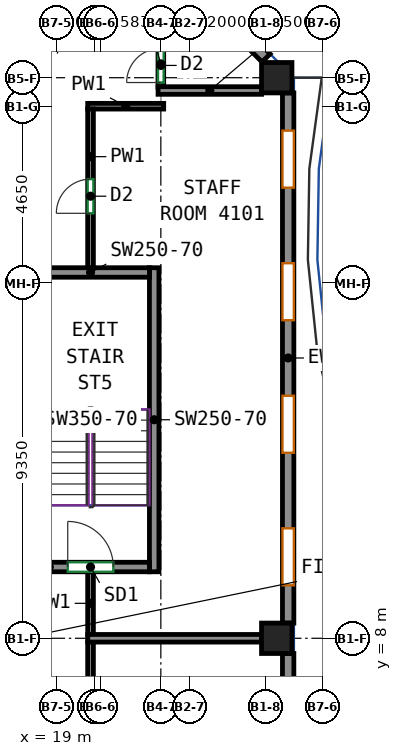
"""IFC4 building model, lengths in metres.
Left out: names, types, materials, properties, quantities, classifications, styles, units other than length and angle.
Written with IfcOpenShell. Run it as: python <this file> out.ifc"""

import sys

from ifc_helpers import new_model, si_unit, direction, frame, frame_2d, origin, origin_2d, place, context, subcontext, project, spatial, rectangle, extrude, source, transform, mapped, element, fill, save


model = new_model("IFC4")
c1 = context("Model", 3, precision=1e-05, world=origin(), true_north=direction((0.0, 1.0)))
c2 = subcontext(c1, "Body", "Model", "MODEL_VIEW")
j1 = project(units=[si_unit("LENGTHUNIT", "METRE"), si_unit("PLANEANGLEUNIT", "RADIAN")], contexts=[c1])
p1 = place(None, origin())
s1 = spatial("IfcSite", under=j1, at=p1, CompositionType="ELEMENT")
p2 = place(p1, origin())
s2 = spatial("IfcBuilding", under=s1, at=p2, CompositionType="ELEMENT")
p3 = place(p2, frame((0.0, 0.0, 175.3)))
s3 = spatial("IfcBuildingStorey", under=s2, at=p3, CompositionType="ELEMENT", Elevation=175.3)
m1 = source(origin(), c2, "Body", "SweptSolid", [
    extrude(rectangle(XDim=0.8, YDim=0.8, at=origin_2d()), origin(), (0.0, 0.0, 1.0), 3.12),
])
for number, where, z_axis, x_axis in (
    (1, (24.8, 8.0, 0.0), (0.0, 0.0, 1.0), (1.0, 0.0, 0.0)),
    (2, (24.8, 22.75, 0.0), (0.0, 0.0, 1.0), (1.0, 0.0, 0.0)),
):
    element("IfcColumn", number, at=place(p3, frame(where, z_axis=z_axis, x_axis=x_axis)), inside=s3, PredefinedType="COLUMN", context=c2, shape_type="MappedRepresentation", body=[
        mapped(m1, transform((0.0, 0.0, 0.0))),
    ])
m2 = source(origin(), c2, "Body", "SweptSolid", [
    extrude(rectangle(XDim=8.0, YDim=0.25, at=frame_2d((4.0, 0.0))), origin(), (0.0, 0.0, 1.0), 3.12),
])
p4 = place(p3, frame((21.575, 9.75, 0.0), z_axis=(0.0, 0.0, 1.0), x_axis=(0.0, 1.0, 0.0)))
e3 = element("IfcWall", 3, at=p4, inside=s3, PredefinedType="SHEAR", context=c2, shape_type="MappedRepresentation", body=[
    mapped(m2, transform((0.0, 0.0, 0.0))),
])
m3 = source(origin(), c2, "Body", "SweptSolid", [
    extrude(rectangle(XDim=3.1, YDim=0.25, at=frame_2d((1.55, 0.0))), origin(), (0.0, 0.0, 1.0), 3.12),
])
p5 = place(p3, frame((18.35, 9.875, 0.0), z_axis=(0.0, 0.0, 1.0), x_axis=(1.0, 0.0, 0.0)))
e4 = element("IfcWall", 4, at=p5, inside=s3, PredefinedType="SHEAR", context=c2, shape_type="MappedRepresentation", body=[
    mapped(m3, transform((0.0, 0.0, 0.0))),
])
p6 = place(p5, frame((0.95, 0.0, 0.0)))
e5 = element("IfcOpeningElement", 5, at=p6, cuts=e4, PredefinedType="OPENING", context=c2, shape_type="SweptSolid", body=[
    extrude(rectangle(XDim=1.2, YDim=2.1, at=frame_2d((0.6, 1.05))), frame((0.0, 0.135, 0.0), z_axis=(0.0, -1.0, 0.0), x_axis=(1.0, 0.0, 0.0)), (0.0, 0.0, 1.0), 0.27),
])
p7 = place(p3, frame((18.35, 17.625, 0.0), z_axis=(0.0, 0.0, 1.0), x_axis=(1.0, 0.0, 0.0)))
e6 = element("IfcWall", 6, at=p7, inside=s3, PredefinedType="SHEAR", context=c2, shape_type="MappedRepresentation", body=[
    mapped(m3, transform((0.0, 0.0, 0.0))),
])
m4 = source(origin(), c2, "Body", "SweptSolid", [
    extrude(rectangle(XDim=7.763, YDim=0.3, at=frame_2d((3.881, 0.0))), origin(), (0.0, 0.0, 1.0), 3.12),
])
p8 = place(p3, frame((25.1, -0.163, 0.0), z_axis=(0.0, 0.0, 1.0), x_axis=(0.0, 1.0, 0.0)))
e7 = element("IfcWall", 7, at=p8, inside=s3, PredefinedType="SOLIDWALL", context=c2, shape_type="MappedRepresentation", body=[
    mapped(m4, transform((0.0, 0.0, 0.0))),
])
p9 = place(p8, frame((1.75, 0.0, 0.85)))
e8 = element("IfcOpeningElement", 8, at=p9, cuts=e7, PredefinedType="OPENING", context=c2, shape_type="SweptSolid", body=[
    extrude(rectangle(XDim=1.5, YDim=1.95, at=frame_2d((0.75, 0.975))), frame((0.0, 0.16, 0.0), z_axis=(0.0, -1.0, 0.0), x_axis=(1.0, 0.0, 0.0)), (0.0, 0.0, 1.0), 0.32),
])
p10 = place(p8, frame((0.45, 0.0, 0.0)))
e9 = element("IfcOpeningElement", 9, at=p10, cuts=e7, PredefinedType="OPENING", context=c2, shape_type="SweptSolid", body=[
    extrude(rectangle(XDim=1.0, YDim=2.1, at=frame_2d((0.5, 1.05))), frame((0.0, 0.16, 0.0), z_axis=(0.0, -1.0, 0.0), x_axis=(1.0, 0.0, 0.0)), (0.0, 0.0, 1.0), 0.32),
])
p11 = place(p8, frame((5.631, 0.0, 0.85)))
e10 = element("IfcOpeningElement", 10, at=p11, cuts=e7, PredefinedType="OPENING", context=c2, shape_type="SweptSolid", body=[
    extrude(rectangle(XDim=1.5, YDim=1.95, at=frame_2d((0.75, 0.975))), frame((0.0, 0.16, 0.0), z_axis=(0.0, -1.0, 0.0), x_axis=(1.0, 0.0, 0.0)), (0.0, 0.0, 1.0), 0.32),
])
p12 = place(p8, frame((4.331, 0.0, 0.0)))
e11 = element("IfcOpeningElement", 11, at=p12, cuts=e7, PredefinedType="OPENING", context=c2, shape_type="SweptSolid", body=[
    extrude(rectangle(XDim=1.0, YDim=2.1, at=frame_2d((0.5, 1.05))), frame((0.0, 0.16, 0.0), z_axis=(0.0, -1.0, 0.0), x_axis=(1.0, 0.0, 0.0)), (0.0, 0.0, 1.0), 0.32),
])
m5 = source(origin(), c2, "Body", "SweptSolid", [
    extrude(rectangle(XDim=13.95, YDim=0.3, at=frame_2d((6.975, 0.0))), origin(), (0.0, 0.0, 1.0), 3.12),
])
p13 = place(p3, frame((25.1, 8.4, 0.0), z_axis=(0.0, 0.0, 1.0), x_axis=(0.0, 1.0, 0.0)))
e12 = element("IfcWall", 12, at=p13, inside=s3, PredefinedType="SOLIDWALL", context=c2, shape_type="MappedRepresentation", body=[
    mapped(m5, transform((0.0, 0.0, 0.0))),
])
p14 = place(p13, frame((0.994, 0.0, 0.85)))
e13 = element("IfcOpeningElement", 13, at=p14, cuts=e12, PredefinedType="OPENING", context=c2, shape_type="SweptSolid", body=[
    extrude(rectangle(XDim=1.5, YDim=1.95, at=frame_2d((0.75, 0.975))), frame((0.0, 0.16, 0.0), z_axis=(0.0, -1.0, 0.0), x_axis=(1.0, 0.0, 0.0)), (0.0, 0.0, 1.0), 0.32),
])
p15 = place(p13, frame((4.481, 0.0, 0.85)))
e14 = element("IfcOpeningElement", 14, at=p15, cuts=e12, PredefinedType="OPENING", context=c2, shape_type="SweptSolid", body=[
    extrude(rectangle(XDim=1.5, YDim=1.95, at=frame_2d((0.75, 0.975))), frame((0.0, 0.16, 0.0), z_axis=(0.0, -1.0, 0.0), x_axis=(1.0, 0.0, 0.0)), (0.0, 0.0, 1.0), 0.32),
])
p16 = place(p13, frame((7.969, 0.0, 0.85)))
e15 = element("IfcOpeningElement", 15, at=p16, cuts=e12, PredefinedType="OPENING", context=c2, shape_type="SweptSolid", body=[
    extrude(rectangle(XDim=1.5, YDim=1.95, at=frame_2d((0.75, 0.975))), frame((0.0, 0.16, 0.0), z_axis=(0.0, -1.0, 0.0), x_axis=(1.0, 0.0, 0.0)), (0.0, 0.0, 1.0), 0.32),
])
p17 = place(p13, frame((11.456, 0.0, 0.85)))
e16 = element("IfcOpeningElement", 16, at=p17, cuts=e12, PredefinedType="OPENING", context=c2, shape_type="SweptSolid", body=[
    extrude(rectangle(XDim=1.5, YDim=1.95, at=frame_2d((0.75, 0.975))), frame((0.0, 0.16, 0.0), z_axis=(0.0, -1.0, 0.0), x_axis=(1.0, 0.0, 0.0)), (0.0, 0.0, 1.0), 0.32),
])
m6 = source(origin(), c2, "Body", "SweptSolid", [
    extrude(rectangle(XDim=3.5, YDim=0.3, at=frame_2d((1.75, 0.0))), origin(), (0.0, 0.0, 1.0), 3.12),
])
p18 = place(p3, frame((24.519, 23.269, 0.0), z_axis=(0.0, 0.0, 1.0), x_axis=(-0.70707190453, 0.707141656123, 0.0)))
e17 = element("IfcWall", 17, at=p18, inside=s3, PredefinedType="SOLIDWALL", context=c2, shape_type="MappedRepresentation", body=[
    mapped(m6, transform((0.0, 0.0, 0.0))),
])
p19 = place(p18, frame((0.65, 0.0, 0.85)))
e18 = element("IfcOpeningElement", 18, at=p19, cuts=e17, PredefinedType="OPENING", context=c2, shape_type="SweptSolid", body=[
    extrude(rectangle(XDim=2.2, YDim=1.95, at=frame_2d((1.1, 0.975))), frame((0.0, 0.16, 0.0), z_axis=(0.0, -1.0, 0.0), x_axis=(1.0, 0.0, 0.0)), (0.0, 0.0, 1.0), 0.32),
])
p20 = place(p3, frame((19.9, 3.809, 0.0), z_axis=(0.0, 0.0, 1.0), x_axis=(0.0, 1.0, 0.0)))
e19 = element("IfcWall", 19, at=p20, inside=s3, PredefinedType="PARTITIONING", context=c2, shape_type="SweptSolid", body=[
    extrude(rectangle(XDim=4.101, YDim=0.15, at=frame_2d((2.05, 0.0))), origin(), (0.0, 0.0, 1.0), 3.12),
])
p21 = place(p20, frame((0.4, 0.0, 0.0)))
e20 = element("IfcOpeningElement", 20, at=p21, cuts=e19, PredefinedType="OPENING", context=c2, shape_type="SweptSolid", body=[
    extrude(rectangle(XDim=1.0, YDim=2.1, at=frame_2d((0.5, 1.05))), frame((0.0, 0.085, 0.0), z_axis=(0.0, -1.0, 0.0), x_axis=(1.0, 0.0, 0.0)), (0.0, 0.0, 1.0), 0.17),
])
p22 = place(p3, frame((19.825, 22.0, 0.0), z_axis=(0.0, 0.0, 1.0), x_axis=(1.0, 0.0, 0.0)))
e21 = element("IfcWall", 21, at=p22, inside=s3, PredefinedType="PARTITIONING", context=c2, shape_type="SweptSolid", body=[
    extrude(rectangle(XDim=2.0, YDim=0.15, at=frame_2d((1.0, 0.0))), origin(), (0.0, 0.0, 1.0), 3.12),
])
p23 = place(p3, frame((19.9, 17.75, 0.0), z_axis=(0.0, 0.0, 1.0), x_axis=(0.0, 1.0, 0.0)))
e22 = element("IfcWall", 22, at=p23, inside=s3, PredefinedType="PARTITIONING", context=c2, shape_type="SweptSolid", body=[
    extrude(rectangle(XDim=4.175, YDim=0.15, at=frame_2d((2.087, 0.0))), origin(), (0.0, 0.0, 1.0), 3.12),
])
p24 = place(p23, frame((1.432, 0.0, 0.0)))
e23 = element("IfcOpeningElement", 23, at=p24, cuts=e22, PredefinedType="OPENING", context=c2, shape_type="SweptSolid", body=[
    extrude(rectangle(XDim=0.9, YDim=2.1, at=frame_2d((0.45, 1.05))), frame((0.0, 0.085, 0.0), z_axis=(0.0, -1.0, 0.0), x_axis=(1.0, 0.0, 0.0)), (0.0, 0.0, 1.0), 0.17),
])
p25 = place(p3, frame((19.9, 8.09, 0.0), z_axis=(0.0, 0.0, 1.0), x_axis=(0.0, 1.0, 0.0)))
e24 = element("IfcWall", 24, at=p25, inside=s3, PredefinedType="PARTITIONING", context=c2, shape_type="SweptSolid", body=[
    extrude(rectangle(XDim=1.66, YDim=0.15, at=frame_2d((0.83, 0.0))), origin(), (0.0, 0.0, 1.0), 3.12),
])
p26 = place(p3, frame((21.75, 22.503, 0.0), z_axis=(0.0, 0.0, 1.0), x_axis=(0.0, 1.0, 0.0)))
e25 = element("IfcWall", 25, at=p26, inside=s3, PredefinedType="PARTITIONING", context=c2, shape_type="SweptSolid", body=[
    extrude(rectangle(XDim=1.222, YDim=0.15, at=frame_2d((0.611, 0.0))), origin(), (0.0, 0.0, 1.0), 3.12),
])
p27 = place(p26, frame((0.12, 0.0, 0.0)))
e26 = element("IfcOpeningElement", 26, at=p27, cuts=e25, PredefinedType="OPENING", context=c2, shape_type="SweptSolid", body=[
    extrude(rectangle(XDim=0.9, YDim=2.1, at=frame_2d((0.45, 1.05))), frame((0.0, 0.085, 0.0), z_axis=(0.0, -1.0, 0.0), x_axis=(1.0, 0.0, 0.0)), (0.0, 0.0, 1.0), 0.17),
])
p28 = place(p3, frame((19.827, 8.0, 0.0), z_axis=(0.0, 0.0, 1.0), x_axis=(1.0, 0.0, 0.0)))
e27 = element("IfcWall", 27, at=p28, inside=s3, PredefinedType="PARTITIONING", context=c2, shape_type="SweptSolid", body=[
    extrude(rectangle(XDim=4.573, YDim=0.2, at=frame_2d((2.287, 0.0))), origin(), (0.0, 0.0, 1.0), 3.12),
])
p29 = place(p3, frame((24.4, 22.413, 0.0), z_axis=(0.0, 0.0, 1.0), x_axis=(-1.0, 0.0, 0.0)))
e28 = element("IfcWall", 28, at=p29, inside=s3, PredefinedType="PARTITIONING", context=c2, shape_type="SweptSolid", body=[
    extrude(rectangle(XDim=2.723, YDim=0.2, at=frame_2d((1.361, 0.0))), origin(), (0.0, 0.0, 1.0), 2.52),
])
p30 = place(p14, origin())
e29 = element("IfcWindow", 29, at=p30, inside=s3, PartitioningType="SINGLE_PANEL", PredefinedType="WINDOW", context=c2, shape_type="SweptSolid", body=[
    extrude(rectangle(XDim=1.5, YDim=1.95, at=frame_2d((0.75, 0.975))), frame((0.0, 0.03, 0.0), z_axis=(0.0, -1.0, 0.0), x_axis=(1.0, 0.0, 0.0)), (0.0, 0.0, 1.0), 0.06),
])
fill(e13, e29)
p31 = place(p15, origin())
e30 = element("IfcWindow", 30, at=p31, inside=s3, PartitioningType="SINGLE_PANEL", PredefinedType="WINDOW", context=c2, shape_type="SweptSolid", body=[
    extrude(rectangle(XDim=1.5, YDim=1.95, at=frame_2d((0.75, 0.975))), frame((0.0, 0.03, 0.0), z_axis=(0.0, -1.0, 0.0), x_axis=(1.0, 0.0, 0.0)), (0.0, 0.0, 1.0), 0.06),
])
fill(e14, e30)
p32 = place(p16, origin())
e31 = element("IfcWindow", 31, at=p32, inside=s3, PartitioningType="SINGLE_PANEL", PredefinedType="WINDOW", context=c2, shape_type="SweptSolid", body=[
    extrude(rectangle(XDim=1.5, YDim=1.95, at=frame_2d((0.75, 0.975))), frame((0.0, 0.03, 0.0), z_axis=(0.0, -1.0, 0.0), x_axis=(1.0, 0.0, 0.0)), (0.0, 0.0, 1.0), 0.06),
])
fill(e15, e31)
p33 = place(p17, origin())
e32 = element("IfcWindow", 32, at=p33, inside=s3, PartitioningType="SINGLE_PANEL", PredefinedType="WINDOW", context=c2, shape_type="SweptSolid", body=[
    extrude(rectangle(XDim=1.5, YDim=1.95, at=frame_2d((0.75, 0.975))), frame((0.0, 0.03, 0.0), z_axis=(0.0, -1.0, 0.0), x_axis=(1.0, 0.0, 0.0)), (0.0, 0.0, 1.0), 0.06),
])
fill(e16, e32)
p34 = place(p6, origin())
e33 = element("IfcDoor", 33, at=p34, inside=s3, OperationType="DOUBLE_DOOR_SINGLE_SWING", PredefinedType="DOOR", context=c2, shape_type="SweptSolid", body=[
    extrude(rectangle(XDim=1.2, YDim=2.1, at=frame_2d((0.6, 1.05))), frame((0.0, 0.025, 0.0), z_axis=(0.0, -1.0, 0.0), x_axis=(1.0, 0.0, 0.0)), (0.0, 0.0, 1.0), 0.05),
])
fill(e5, e33)
p35 = place(p24, origin())
e34 = element("IfcDoor", 34, at=p35, inside=s3, OperationType="SINGLE_SWING_LEFT", PredefinedType="DOOR", context=c2, shape_type="SweptSolid", body=[
    extrude(rectangle(XDim=0.9, YDim=2.1, at=frame_2d((0.45, 1.05))), frame((0.0, 0.025, 0.0), z_axis=(0.0, -1.0, 0.0), x_axis=(1.0, 0.0, 0.0)), (0.0, 0.0, 1.0), 0.05),
])
fill(e23, e34)
p36 = place(p27, origin())
e35 = element("IfcDoor", 35, at=p36, inside=s3, OperationType="SINGLE_SWING_LEFT", PredefinedType="DOOR", context=c2, shape_type="SweptSolid", body=[
    extrude(rectangle(XDim=0.9, YDim=2.1, at=frame_2d((0.45, 1.05))), frame((0.0, 0.025, 0.0), z_axis=(0.0, -1.0, 0.0), x_axis=(1.0, 0.0, 0.0)), (0.0, 0.0, 1.0), 0.05),
])
fill(e26, e35)
save(model, sys.argv[1])
